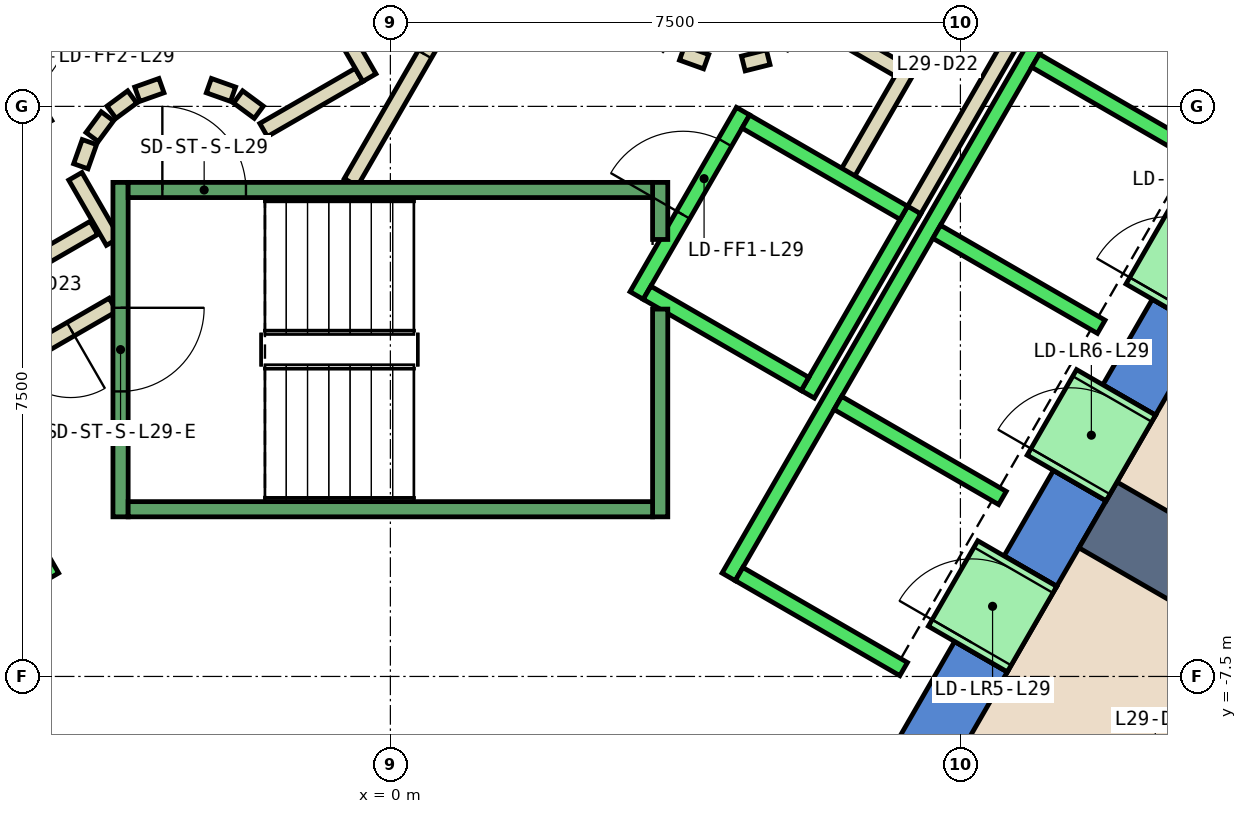
"""IFC4 building model, lengths in metres.
Left out: names, types, materials, properties, quantities, classifications, styles, units other than length and angle.
Written with IfcOpenShell. Run it as: python <this file> out.ifc"""

import sys

from ifc_helpers import new_model, si_unit, direction, frame, frame_2d, origin, place, context, subcontext, project, spatial, polyline, rectangle, outline, extrude, element, fill, save


model = new_model("IFC4")
c1 = context("Model", 3, precision=1e-05, world=origin(), true_north=direction((0.0, 1.0)))
c2 = subcontext(c1, "Body", "Model", "MODEL_VIEW")
j1 = project(units=[si_unit("LENGTHUNIT", "METRE"), si_unit("PLANEANGLEUNIT", "RADIAN")], contexts=[c1])
p1 = place(None, origin())
s1 = spatial("IfcSite", under=j1, at=p1, CompositionType="ELEMENT")
p2 = place(p1, origin())
s2 = spatial("IfcBuilding", under=s1, at=p2, CompositionType="ELEMENT")
p3 = place(p2, frame((0.0, 0.0, 132.8)))
s3 = spatial("IfcBuildingStorey", under=s2, at=p3, CompositionType="ELEMENT", Elevation=132.8)
p4 = place(p3, frame((0.0, 0.0, -0.6)))
e1 = element("IfcWall", 1, at=p4, inside=s3, PredefinedType="SHEAR", context=c2, shape_type="SweptSolid", body=[
    extrude(outline(polyline([(8.117, -7.44), (7.424, -7.04), (6.466, -8.7), (6.928, -9.5), (8.117, -7.44)])), origin(), (0.0, 0.0, 1.0), 5.4),
])
p5 = place(p3, frame((0.0, 0.0, -0.6)))
e2 = element("IfcWall", 2, at=p5, inside=s3, PredefinedType="SHEAR", context=c2, shape_type="SweptSolid", body=[
    extrude(outline(polyline([(9.417, -5.189), (8.724, -4.789), (8.075, -5.914), (8.767, -6.314), (9.417, -5.189)])), origin(), (0.0, 0.0, 1.0), 5.4),
])
p6 = place(p3, frame((0.0, 0.0, -0.6)))
e3 = element("IfcWall", 3, at=p6, inside=s3, PredefinedType="SHEAR", context=c2, shape_type="SweptSolid", body=[
    extrude(outline(polyline([(10.717, -2.937), (10.025, -2.537), (9.374, -3.663), (10.067, -4.063), (10.717, -2.937)])), origin(), (0.0, 0.0, 1.0), 5.4),
])
p7 = place(p3, frame((0.0, 0.0, 3.6)))
e4 = element("IfcWall", 4, at=p7, inside=s3, PredefinedType="SHEAR", context=c2, shape_type="SweptSolid", body=[
    extrude(outline(polyline([(8.767, -6.314), (8.075, -5.914), (7.424, -7.04), (8.117, -7.44), (8.767, -6.314)])), origin(), (0.0, 0.0, 1.0), 1.2),
])
p8 = place(p3, frame((0.0, 0.0, 3.6)))
e5 = element("IfcWall", 5, at=p8, inside=s3, PredefinedType="SHEAR", context=c2, shape_type="SweptSolid", body=[
    extrude(outline(polyline([(10.067, -4.063), (9.374, -3.663), (8.724, -4.789), (9.417, -5.189), (10.067, -4.063)])), origin(), (0.0, 0.0, 1.0), 1.2),
])
p9 = place(p3, frame((0.0, 0.0, 3.6)))
e6 = element("IfcWall", 6, at=p9, inside=s3, PredefinedType="SHEAR", context=c2, shape_type="SweptSolid", body=[
    extrude(outline(polyline([(11.367, -1.811), (10.675, -1.411), (10.025, -2.537), (10.717, -2.937), (11.367, -1.811)])), origin(), (0.0, 0.0, 1.0), 1.2),
])
p10 = place(p3, frame((9.31, -5.375, 0.0), z_axis=(0.0, 0.0, 1.0), x_axis=(0.86602173752, -0.500006350103, 0.0)))
e7 = element("IfcWall", 7, at=p10, inside=s3, PredefinedType="SHEAR", context=c2, shape_type="SweptSolid", body=[
    extrude(rectangle(XDim=31.463, YDim=1.0, at=frame_2d((15.732, 0.0))), origin(), (0.0, 0.0, 1.0), 4.8),
])
p11 = place(p3, frame((5.499, 1.172, 0.0), z_axis=(0.0, 0.0, 1.0), x_axis=(0.866333505267, -0.499465972466, 0.0)))
e8 = element("IfcWall", 8, at=p11, inside=s3, PredefinedType="PARTITIONING", context=c2, shape_type="SweptSolid", body=[
    extrude(rectangle(XDim=1.374, YDim=0.2, at=frame_2d((0.687, 0.0))), origin(), (0.0, 0.0, 1.0), 4.8),
])
p12 = place(p3, frame((6.826, 0.522, 0.0), z_axis=(0.0, 0.0, 1.0), x_axis=(-0.500016722714, -0.866015748706, 0.0)))
e9 = element("IfcWall", 9, at=p12, inside=s3, PredefinedType="PARTITIONING", context=c2, shape_type="SweptSolid", body=[
    extrude(rectangle(XDim=1.7, YDim=0.2, at=frame_2d((0.85, 0.0))), origin(), (0.0, 0.0, 1.0), 4.8),
])
p13 = place(p3, frame((8.192, 0.888, 0.0), z_axis=(0.0, 0.0, 1.0), x_axis=(-0.499940625693, -0.866059680843, 0.0)))
e10 = element("IfcWall", 10, at=p13, inside=s3, PredefinedType="PARTITIONING", context=c2, shape_type="SweptSolid", body=[
    extrude(rectangle(XDim=2.68, YDim=0.2, at=frame_2d((1.34, 0.0))), origin(), (0.0, 0.0, 1.0), 4.8),
])
p14 = place(p3, frame((-3.9, -1.599, 0.0), z_axis=(0.0, 0.0, 1.0), x_axis=(-0.865969445389, -0.500096910261, 0.0)))
e11 = element("IfcWall", 11, at=p14, inside=s3, PredefinedType="PARTITIONING", context=c2, shape_type="SweptSolid", body=[
    extrude(rectangle(XDim=1.373, YDim=0.2, at=frame_2d((0.687, 0.0))), origin(), (0.0, 0.0, 1.0), 4.8),
])
p15 = place(p3, frame((-4.145, -0.92, 0.0), z_axis=(0.0, 0.0, 1.0), x_axis=(0.499743786207, -0.866173278362, 0.0)))
e12 = element("IfcWall", 12, at=p15, inside=s3, PredefinedType="PARTITIONING", context=c2, shape_type="SweptSolid", body=[
    extrude(rectangle(XDim=0.991, YDim=0.2, at=frame_2d((0.495, 0.0))), origin(), (0.0, 0.0, 1.0), 4.8),
])
p16 = place(p3, frame((-3.65, -2.61, 0.0), z_axis=(0.0, 0.0, 1.0), x_axis=(-0.866072462134, -0.499918483688, 0.0)))
e13 = element("IfcWall", 13, at=p16, inside=s3, PredefinedType="PARTITIONING", context=c2, shape_type="SweptSolid", body=[
    extrude(rectangle(XDim=2.084, YDim=0.2, at=frame_2d((1.042, 0.0))), origin(), (0.0, 0.0, 1.0), 4.8),
])
p17 = place(p16, frame((0.642, 0.0, 0.0)))
e14 = element("IfcOpeningElement", 14, at=p17, cuts=e13, PredefinedType="OPENING", context=c2, shape_type="SweptSolid", body=[
    extrude(rectangle(XDim=0.9, YDim=2.1, at=frame_2d((0.45, 1.05))), frame((0.0, 0.11, 0.0), z_axis=(0.0, -1.0, 0.0), x_axis=(1.0, 0.0, 0.0)), (0.0, 0.0, 1.0), 0.22),
])
p18 = place(p3, frame((3.838, 0.702, 0.0), z_axis=(0.0, 0.0, 1.0), x_axis=(0.941035081519, -0.338308993895, 0.0)))
e15 = element("IfcWall", 15, at=p18, inside=s3, PredefinedType="PARTITIONING", context=c2, shape_type="SweptSolid", body=[
    extrude(rectangle(XDim=0.337, YDim=0.2, at=frame_2d((0.168, 0.0))), origin(), (0.0, 0.0, 1.0), 4.8),
])
p19 = place(p3, frame((4.644, 0.564, 0.0), z_axis=(0.0, 0.0, 1.0), x_axis=(0.969929076366, 0.243387729394, 0.0)))
e16 = element("IfcWall", 16, at=p19, inside=s3, PredefinedType="PARTITIONING", context=c2, shape_type="SweptSolid", body=[
    extrude(rectangle(XDim=0.337, YDim=0.2, at=frame_2d((0.168, 0.0))), origin(), (0.0, 0.0, 1.0), 4.8),
])
p20 = place(p3, frame((-0.52, -1.0, 0.0), z_axis=(0.0, 0.0, 1.0), x_axis=(0.50011622646, 0.865958290007, 0.0)))
e17 = element("IfcWall", 17, at=p20, inside=s3, PredefinedType="PARTITIONING", context=c2, shape_type="SweptSolid", body=[
    extrude(rectangle(XDim=4.991, YDim=0.2, at=frame_2d((2.496, 0.0))), origin(), (0.0, 0.0, 1.0), 4.8),
])
p21 = place(p20, frame((1.945, 0.0, 0.0)))
e18 = element("IfcOpeningElement", 18, at=p21, cuts=e17, PredefinedType="OPENING", context=c2, shape_type="SweptSolid", body=[
    extrude(rectangle(XDim=1.0, YDim=2.1, at=frame_2d((0.5, 1.05))), frame((0.0, 0.11, 0.0), z_axis=(0.0, -1.0, 0.0), x_axis=(1.0, 0.0, 0.0)), (0.0, 0.0, 1.0), 0.22),
])
p22 = place(p3, frame((-0.412, 0.414, 0.0), z_axis=(0.0, 0.0, 1.0), x_axis=(-0.866017369001, -0.500013916395, 0.0)))
e19 = element("IfcWall", 19, at=p22, inside=s3, PredefinedType="PARTITIONING", context=c2, shape_type="SweptSolid", body=[
    extrude(rectangle(XDim=1.45, YDim=0.2, at=frame_2d((0.725, 0.0))), origin(), (0.0, 0.0, 1.0), 4.8),
])
p23 = place(p3, frame((-1.731, -0.077, 0.0), z_axis=(0.0, 0.0, 1.0), x_axis=(-0.804311165252, 0.594208338422, 0.0)))
e20 = element("IfcWall", 20, at=p23, inside=s3, PredefinedType="PARTITIONING", context=c2, shape_type="SweptSolid", body=[
    extrude(rectangle(XDim=0.338, YDim=0.2, at=frame_2d((0.169, 0.0))), origin(), (0.0, 0.0, 1.0), 4.8),
])
p24 = place(p3, frame((-2.07, 0.16, 0.0), z_axis=(0.0, 0.0, 1.0), x_axis=(-0.942199461132, 0.335052496547, 0.0)))
e21 = element("IfcWall", 21, at=p24, inside=s3, PredefinedType="PARTITIONING", context=c2, shape_type="SweptSolid", body=[
    extrude(rectangle(XDim=0.337, YDim=0.2, at=frame_2d((0.169, 0.0))), origin(), (0.0, 0.0, 1.0), 4.8),
])
p25 = place(p3, frame((-3.012, 0.273, 0.0), z_axis=(0.0, 0.0, 1.0), x_axis=(-0.942280615813, -0.334824194261, 0.0)))
e22 = element("IfcWall", 22, at=p25, inside=s3, PredefinedType="PARTITIONING", context=c2, shape_type="SweptSolid", body=[
    extrude(rectangle(XDim=0.338, YDim=0.2, at=frame_2d((0.169, 0.0))), origin(), (0.0, 0.0, 1.0), 4.8),
])
p26 = place(p3, frame((-3.397, 0.124, 0.0), z_axis=(0.0, 0.0, 1.0), x_axis=(-0.804311165252, -0.594208338422, 0.0)))
e23 = element("IfcWall", 23, at=p26, inside=s3, PredefinedType="PARTITIONING", context=c2, shape_type="SweptSolid", body=[
    extrude(rectangle(XDim=0.338, YDim=0.2, at=frame_2d((0.169, 0.0))), origin(), (0.0, 0.0, 1.0), 4.8),
])
p27 = place(p3, frame((-3.723, -0.131, 0.0), z_axis=(0.0, 0.0, 1.0), x_axis=(-0.594675113454, -0.803966112121, 0.0)))
e24 = element("IfcWall", 24, at=p27, inside=s3, PredefinedType="PARTITIONING", context=c2, shape_type="SweptSolid", body=[
    extrude(rectangle(XDim=0.338, YDim=0.2, at=frame_2d((0.169, 0.0))), origin(), (0.0, 0.0, 1.0), 4.8),
])
p28 = place(p3, frame((-3.96, -0.47, 0.0), z_axis=(0.0, 0.0, 1.0), x_axis=(-0.334824194261, -0.942280615813, 0.0)))
e25 = element("IfcWall", 25, at=p28, inside=s3, PredefinedType="PARTITIONING", context=c2, shape_type="SweptSolid", body=[
    extrude(rectangle(XDim=0.338, YDim=0.2, at=frame_2d((0.169, 0.0))), origin(), (0.0, 0.0, 1.0), 4.8),
])
p29 = place(p3, frame((-2.771, 4.7, 0.0), z_axis=(0.0, 0.0, 1.0), x_axis=(0.499969479948, -0.866043023828, 0.0)))
e26 = element("IfcWall", 26, at=p29, inside=s3, PredefinedType="PARTITIONING", context=c2, shape_type="SweptSolid", body=[
    extrude(rectangle(XDim=4.99, YDim=0.2, at=frame_2d((2.495, 0.0))), origin(), (0.0, 0.0, 1.0), 4.8),
])
p30 = place(p29, frame((1.945, 0.0, 0.0)))
e27 = element("IfcOpeningElement", 27, at=p30, cuts=e26, PredefinedType="OPENING", context=c2, shape_type="SweptSolid", body=[
    extrude(rectangle(XDim=1.0, YDim=2.1, at=frame_2d((0.5, 1.05))), frame((0.0, 0.11, 0.0), z_axis=(0.0, -1.0, 0.0), x_axis=(1.0, 0.0, 0.0)), (0.0, 0.0, 1.0), 0.22),
])
p31 = place(p3, frame((10.89, -7.437, 0.0), z_axis=(0.0, 0.0, 1.0), x_axis=(-0.499905227862, -0.86608011359, 0.0)))
e28 = element("IfcWall", 28, at=p31, inside=s3, PredefinedType="PARTITIONING", context=c2, shape_type="SweptSolid", body=[
    extrude(rectangle(XDim=3.43, YDim=0.2, at=frame_2d((1.715, 0.0))), origin(), (0.0, 0.0, 1.0), 4.8),
])
p32 = place(p31, frame((1.152, 0.0, 0.0)))
e29 = element("IfcOpeningElement", 29, at=p32, cuts=e28, PredefinedType="OPENING", context=c2, shape_type="SweptSolid", body=[
    extrude(rectangle(XDim=1.0, YDim=2.1, at=frame_2d((0.5, 1.05))), frame((0.0, 0.11, 0.0), z_axis=(0.0, -1.0, 0.0), x_axis=(1.0, 0.0, 0.0)), (0.0, 0.0, 1.0), 0.22),
])
p33 = place(p3, frame((-9.751, 2.99, 0.0), z_axis=(0.0, 0.0, 1.0), x_axis=(0.50000090737, -0.866024879913, 0.0)))
e30 = element("IfcWall", 30, at=p33, inside=s3, PredefinedType="STANDARD", context=c2, shape_type="SweptSolid", body=[
    extrude(rectangle(XDim=10.6, YDim=0.2, at=frame_2d((5.3, 0.0))), origin(), (0.0, 0.0, 1.0), 4.8),
])
p34 = place(p3, frame((3.24, -2.488, 0.0), z_axis=(0.0, 0.0, 1.0), x_axis=(0.49994636267, 0.866056369097, 0.0)))
e31 = element("IfcWall", 31, at=p34, inside=s3, PredefinedType="STANDARD", context=c2, shape_type="SweptSolid", body=[
    extrude(rectangle(XDim=2.8, YDim=0.2, at=frame_2d((1.4, 0.0))), origin(), (0.0, 0.0, 1.0), 4.8),
])
p35 = place(p34, frame((1.225, 0.0, 0.0)))
e32 = element("IfcOpeningElement", 32, at=p35, cuts=e31, PredefinedType="OPENING", context=c2, shape_type="SweptSolid", body=[
    extrude(rectangle(XDim=1.1, YDim=2.1, at=frame_2d((0.55, 1.05))), frame((0.0, 0.11, 0.0), z_axis=(0.0, -1.0, 0.0), x_axis=(1.0, 0.0, 0.0)), (0.0, 0.0, 1.0), 0.22),
])
p36 = place(p3, frame((5.492, -3.788, 0.0), z_axis=(0.0, 0.0, 1.0), x_axis=(0.500011755427, 0.866018616679, 0.0)))
e33 = element("IfcWall", 33, at=p36, inside=s3, PredefinedType="STANDARD", context=c2, shape_type="SweptSolid", body=[
    extrude(rectangle(XDim=2.8, YDim=0.2, at=frame_2d((1.4, 0.0))), origin(), (0.0, 0.0, 1.0), 4.8),
])
p37 = place(p3, frame((3.377, -2.452, 0.0), z_axis=(0.0, 0.0, 1.0), x_axis=(0.865955154139, -0.50012165622, 0.0)))
e34 = element("IfcWall", 34, at=p37, inside=s3, PredefinedType="STANDARD", context=c2, shape_type="SweptSolid", body=[
    extrude(rectangle(XDim=2.4, YDim=0.2, at=frame_2d((1.2, 0.0))), origin(), (0.0, 0.0, 1.0), 4.8),
])
p38 = place(p3, frame((4.677, -0.2, 0.0), z_axis=(0.0, 0.0, 1.0), x_axis=(0.865973769406, -0.500089422704, 0.0)))
e35 = element("IfcWall", 35, at=p38, inside=s3, PredefinedType="STANDARD", context=c2, shape_type="SweptSolid", body=[
    extrude(rectangle(XDim=2.399, YDim=0.2, at=frame_2d((1.2, 0.0))), origin(), (0.0, 0.0, 1.0), 4.8),
])
p39 = place(p3, frame((4.451, -6.19, 0.0), z_axis=(0.0, 0.0, 1.0), x_axis=(0.50000090737, 0.866024879913, 0.0)))
e36 = element("IfcWall", 36, at=p39, inside=s3, PredefinedType="STANDARD", context=c2, shape_type="SweptSolid", body=[
    extrude(rectangle(XDim=10.6, YDim=0.2, at=frame_2d((5.3, 0.0))), origin(), (0.0, 0.0, 1.0), 4.8),
])
for number, where, z_axis, x_axis in (
    (37, (4.588, -6.153, 0.0), (0.0, 0.0, 1.0), (0.866, -0.5, 0.0)),
    (38, (5.888, -3.902, 0.0), (0.0, 0.0, 1.0), (0.866, -0.5, 0.0)),
    (39, (7.188, -1.65, 0.0), (0.0, 0.0, 1.0), (0.866, -0.5, 0.0)),
    (40, (8.488, 0.602, 0.0), (0.0, 0.0, 1.0), (0.866, -0.5, 0.0)),
):
    element("IfcWall", number, at=place(p3, frame(where, z_axis=z_axis, x_axis=x_axis)), inside=s3, PredefinedType="STANDARD", context=c2, shape_type="SweptSolid", body=[
        extrude(rectangle(XDim=2.5, YDim=0.2, at=frame_2d((1.25, 0.0))), origin(), (0.0, 0.0, 1.0), 4.8),
    ])
p40 = place(p3, frame((7.598, -7.14, 0.0), z_axis=(0.0, 0.0, 1.0), x_axis=(0.500362116554, 0.865816234728, 0.0)))
e41 = element("IfcWall", 41, at=p40, inside=s3, PredefinedType="STANDARD", context=c2, shape_type="SweptSolid", body=[
    extrude(rectangle(XDim=1.299, YDim=1.2, at=frame_2d((0.65, 0.0))), origin(), (0.0, 0.0, 1.0), 2.4),
])
p41 = place(p40, frame((0.1, 0.0, 0.0)))
e42 = element("IfcOpeningElement", 42, at=p41, cuts=e41, PredefinedType="OPENING", context=c2, shape_type="SweptSolid", body=[
    extrude(rectangle(XDim=1.1, YDim=2.3, at=frame_2d((0.55, 1.15))), frame((0.0, 0.61, 0.0), z_axis=(0.0, -1.0, 0.0), x_axis=(1.0, 0.0, 0.0)), (0.0, 0.0, 1.0), 1.22),
])
p42 = place(p3, frame((8.898, -4.889, 0.0), z_axis=(0.0, 0.0, 1.0), x_axis=(0.500036693733, 0.866004217611, 0.0)))
e43 = element("IfcWall", 43, at=p42, inside=s3, PredefinedType="STANDARD", context=c2, shape_type="SweptSolid", body=[
    extrude(rectangle(XDim=1.3, YDim=1.2, at=frame_2d((0.65, 0.0))), origin(), (0.0, 0.0, 1.0), 2.4),
])
p43 = place(p42, frame((0.1, 0.0, 0.0)))
e44 = element("IfcOpeningElement", 44, at=p43, cuts=e43, PredefinedType="OPENING", context=c2, shape_type="SweptSolid", body=[
    extrude(rectangle(XDim=1.1, YDim=2.3, at=frame_2d((0.55, 1.15))), frame((0.0, 0.61, 0.0), z_axis=(0.0, -1.0, 0.0), x_axis=(1.0, 0.0, 0.0)), (0.0, 0.0, 1.0), 1.22),
])
p44 = place(p3, frame((10.198, -2.637, 0.0), z_axis=(0.0, 0.0, 1.0), x_axis=(0.49989585183, 0.866085525409, 0.0)))
e45 = element("IfcWall", 45, at=p44, inside=s3, PredefinedType="STANDARD", context=c2, shape_type="SweptSolid", body=[
    extrude(rectangle(XDim=1.3, YDim=1.2, at=frame_2d((0.65, 0.0))), origin(), (0.0, 0.0, 1.0), 2.4),
])
p45 = place(p44, frame((0.1, 0.0, 0.0)))
e46 = element("IfcOpeningElement", 46, at=p45, cuts=e45, PredefinedType="OPENING", context=c2, shape_type="SweptSolid", body=[
    extrude(rectangle(XDim=1.1, YDim=2.3, at=frame_2d((0.55, 1.15))), frame((0.0, 0.61, 0.0), z_axis=(0.0, -1.0, 0.0), x_axis=(1.0, 0.0, 0.0)), (0.0, 0.0, 1.0), 1.22),
])
p46 = place(p3, frame((-3.55, -1.0, 0.0), z_axis=(0.0, 0.0, 1.0), x_axis=(0.0, -1.0, 0.0)))
e47 = element("IfcWall", 47, at=p46, inside=s3, PredefinedType="STANDARD", context=c2, shape_type="SweptSolid", body=[
    extrude(rectangle(XDim=4.4, YDim=0.2, at=frame_2d((2.2, 0.0))), origin(), (0.0, 0.0, 1.0), 4.8),
])
p47 = place(p46, frame((1.65, 0.0, 0.0)))
e48 = element("IfcOpeningElement", 48, at=p47, cuts=e47, PredefinedType="OPENING", context=c2, shape_type="SweptSolid", body=[
    extrude(rectangle(XDim=1.1, YDim=2.2, at=frame_2d((0.55, 1.1))), frame((0.0, 0.11, 0.0), z_axis=(0.0, -1.0, 0.0), x_axis=(1.0, 0.0, 0.0)), (0.0, 0.0, 1.0), 0.22),
])
p48 = place(p3, frame((3.55, -2.667, 0.0), z_axis=(0.0, 0.0, 1.0), x_axis=(0.0, -1.0, 0.0)))
e49 = element("IfcWall", 49, at=p48, inside=s3, PredefinedType="STANDARD", context=c2, shape_type="SweptSolid", body=[
    extrude(rectangle(XDim=2.733, YDim=0.2, at=frame_2d((1.366, 0.0))), origin(), (0.0, 0.0, 1.0), 4.8),
])
p49 = place(p3, frame((3.55, -1.0, 0.0), z_axis=(0.0, 0.0, 1.0), x_axis=(0.0, -1.0, 0.0)))
e50 = element("IfcWall", 50, at=p49, inside=s3, PredefinedType="STANDARD", context=c2, shape_type="SweptSolid", body=[
    extrude(rectangle(XDim=0.751, YDim=0.2, at=frame_2d((0.375, 0.0))), origin(), (0.0, 0.0, 1.0), 4.8),
])
p50 = place(p3, frame((-3.45, -1.1, 0.0), z_axis=(0.0, 0.0, 1.0), x_axis=(1.0, 0.0, 0.0)))
e51 = element("IfcWall", 51, at=p50, inside=s3, PredefinedType="STANDARD", context=c2, shape_type="SweptSolid", body=[
    extrude(rectangle(XDim=6.9, YDim=0.2, at=frame_2d((3.45, 0.0))), origin(), (0.0, 0.0, 1.0), 4.8),
])
p51 = place(p50, frame((0.45, 0.0, 0.0)))
e52 = element("IfcOpeningElement", 52, at=p51, cuts=e51, PredefinedType="OPENING", context=c2, shape_type="SweptSolid", body=[
    extrude(rectangle(XDim=1.1, YDim=2.2, at=frame_2d((0.55, 1.1))), frame((0.0, 0.11, 0.0), z_axis=(0.0, -1.0, 0.0), x_axis=(1.0, 0.0, 0.0)), (0.0, 0.0, 1.0), 0.22),
])
p52 = place(p3, frame((-3.45, -5.3, 0.0), z_axis=(0.0, 0.0, 1.0), x_axis=(1.0, 0.0, 0.0)))
e53 = element("IfcWall", 53, at=p52, inside=s3, PredefinedType="STANDARD", context=c2, shape_type="SweptSolid", body=[
    extrude(rectangle(XDim=6.9, YDim=0.2, at=frame_2d((3.45, 0.0))), origin(), (0.0, 0.0, 1.0), 4.8),
])
p53 = place(p21, origin())
e54 = element("IfcDoor", 54, at=p53, inside=s3, OperationType="SINGLE_SWING_LEFT", PredefinedType="DOOR", context=c2, shape_type="SweptSolid", body=[
    extrude(rectangle(XDim=1.0, YDim=2.1, at=frame_2d((0.5, 1.05))), frame((0.0, 0.025, 0.0), z_axis=(0.0, -1.0, 0.0), x_axis=(1.0, 0.0, 0.0)), (0.0, 0.0, 1.0), 0.05),
])
fill(e18, e54)
p54 = place(p17, origin())
e55 = element("IfcDoor", 55, at=p54, inside=s3, OperationType="SINGLE_SWING_LEFT", PredefinedType="DOOR", context=c2, shape_type="SweptSolid", body=[
    extrude(rectangle(XDim=0.9, YDim=2.1, at=frame_2d((0.45, 1.05))), frame((0.0, 0.025, 0.0), z_axis=(0.0, -1.0, 0.0), x_axis=(1.0, 0.0, 0.0)), (0.0, 0.0, 1.0), 0.05),
])
fill(e14, e55)
p55 = place(p41, origin())
e56 = element("IfcDoor", 56, at=p55, inside=s3, OperationType="SLIDING_TO_LEFT", PredefinedType="DOOR", context=c2, shape_type="SweptSolid", body=[
    extrude(rectangle(XDim=1.1, YDim=2.3, at=frame_2d((0.55, 1.15))), frame((0.0, 0.025, 0.0), z_axis=(0.0, -1.0, 0.0), x_axis=(1.0, 0.0, 0.0)), (0.0, 0.0, 1.0), 0.05),
])
fill(e42, e56)
p56 = place(p43, origin())
e57 = element("IfcDoor", 57, at=p56, inside=s3, OperationType="SLIDING_TO_LEFT", PredefinedType="DOOR", context=c2, shape_type="SweptSolid", body=[
    extrude(rectangle(XDim=1.1, YDim=2.3, at=frame_2d((0.55, 1.15))), frame((0.0, 0.025, 0.0), z_axis=(0.0, -1.0, 0.0), x_axis=(1.0, 0.0, 0.0)), (0.0, 0.0, 1.0), 0.05),
])
fill(e44, e57)
p57 = place(p35, origin())
e58 = element("IfcDoor", 58, at=p57, inside=s3, OperationType="SLIDING_TO_LEFT", PredefinedType="DOOR", context=c2, shape_type="SweptSolid", body=[
    extrude(rectangle(XDim=1.1, YDim=2.1, at=frame_2d((0.55, 1.05))), frame((0.0, 0.025, 0.0), z_axis=(0.0, -1.0, 0.0), x_axis=(1.0, 0.0, 0.0)), (0.0, 0.0, 1.0), 0.05),
])
fill(e32, e58)
p58 = place(p51, origin())
e59 = element("IfcDoor", 59, at=p58, inside=s3, OperationType="SINGLE_SWING_LEFT", PredefinedType="DOOR", context=c2, shape_type="SweptSolid", body=[
    extrude(rectangle(XDim=1.1, YDim=2.2, at=frame_2d((0.55, 1.1))), frame((0.0, 0.025, 0.0), z_axis=(0.0, -1.0, 0.0), x_axis=(1.0, 0.0, 0.0)), (0.0, 0.0, 1.0), 0.05),
])
fill(e52, e59)
p59 = place(p47, origin())
e60 = element("IfcDoor", 60, at=p59, inside=s3, OperationType="SINGLE_SWING_LEFT", PredefinedType="DOOR", context=c2, shape_type="SweptSolid", body=[
    extrude(rectangle(XDim=1.1, YDim=2.2, at=frame_2d((0.55, 1.1))), frame((0.0, 0.025, 0.0), z_axis=(0.0, -1.0, 0.0), x_axis=(1.0, 0.0, 0.0)), (0.0, 0.0, 1.0), 0.05),
])
fill(e48, e60)
save(model, sys.argv[1])
